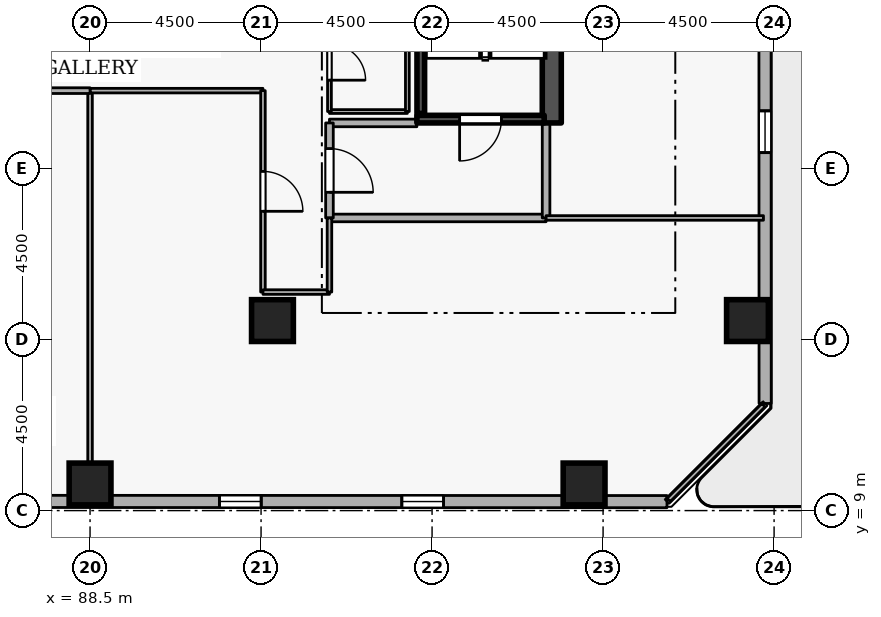
"""IFC4 building model, lengths in metres.
Left out: names, types, materials, properties, quantities, classifications, styles, units other than length and angle.
Written with IfcOpenShell. Run it as: python <this file> out.ifc"""

import sys

from ifc_helpers import new_model, si_unit, direction, frame, frame_2d, origin, origin_2d, place, context, subcontext, project, spatial, rectangle, extrude, element, fill, save


model = new_model("IFC4")
c1 = context("Model", 3, precision=1e-05, world=origin(), true_north=direction((0.0, 1.0)))
c2 = subcontext(c1, "Body", "Model", "MODEL_VIEW")
j1 = project(units=[si_unit("LENGTHUNIT", "METRE"), si_unit("PLANEANGLEUNIT", "RADIAN")], contexts=[c1])
p1 = place(None, origin())
s1 = spatial("IfcSite", under=j1, at=p1, CompositionType="ELEMENT")
p2 = place(p1, origin())
s2 = spatial("IfcBuilding", under=s1, at=p2, CompositionType="ELEMENT")
p3 = place(p2, frame((0.0, 0.0, 174.3)))
s3 = spatial("IfcBuildingStorey", under=s2, at=p3, CompositionType="ELEMENT", Elevation=174.3)
p4 = place(p3, frame((100.65, 19.2, 0.0), z_axis=(0.0, 0.0, 1.0), x_axis=(0.0, 1.0, 0.0)))
e1 = element("IfcWall", 1, at=p4, inside=s3, PredefinedType="SHEAR", context=c2, shape_type="SweptSolid", body=[
    extrude(rectangle(XDim=15.6, YDim=0.5, at=frame_2d((7.8, 0.0))), origin(), (0.0, 0.0, 1.0), 4.2),
])
for number, where, z_axis, x_axis in (
    (2, (105.8, 14.0, 0.0), (0.0, 0.0, 1.0), (1.0, 0.0, 0.0)),
    (3, (101.5, 9.7, 0.0), (0.0, 0.0, 1.0), (1.0, 0.0, 0.0)),
    (4, (88.5, 9.7, 0.0), (0.0, 0.0, 1.0), (1.0, 0.0, 0.0)),
    (5, (93.3, 14.0, 0.0), (0.0, 0.0, 1.0), (1.0, 0.0, 0.0)),
):
    element("IfcColumn", number, at=place(p3, frame(where, z_axis=z_axis, x_axis=x_axis)), inside=s3, PredefinedType="COLUMN", context=c2, shape_type="SweptSolid", body=[
        extrude(rectangle(XDim=1.1, YDim=1.1, at=origin_2d()), origin(), (0.0, 0.0, 1.0), 4.2),
    ])
p5 = place(p3, frame((70.904, 9.247, 0.0), z_axis=(0.0, 0.0, 1.0), x_axis=(0.999999933399, -0.000364968916, 0.0)))
e6 = element("IfcWall", 6, at=p5, inside=s3, PredefinedType="STANDARD", context=c2, shape_type="SweptSolid", body=[
    extrude(rectangle(XDim=32.778, YDim=0.32, at=frame_2d((16.389, 0.0))), origin(), (0.0, 0.0, 1.0), 3.3),
])
p6 = place(p5, frame((1.8, 0.0, 0.72)))
e7 = element("IfcOpeningElement", 7, at=p6, cuts=e6, PredefinedType="OPENING", context=c2, shape_type="SweptSolid", body=[
    extrude(rectangle(XDim=1.1, YDim=1.8, at=frame_2d((0.55, 0.9))), frame((0.0, 0.17, 0.0), z_axis=(0.0, -1.0, 0.0), x_axis=(1.0, 0.0, 0.0)), (0.0, 0.0, 1.0), 0.34),
])
p7 = place(p5, frame((6.6, 0.0, 0.72)))
e8 = element("IfcOpeningElement", 8, at=p7, cuts=e6, PredefinedType="OPENING", context=c2, shape_type="SweptSolid", body=[
    extrude(rectangle(XDim=1.1, YDim=1.8, at=frame_2d((0.55, 0.9))), frame((0.0, 0.17, 0.0), z_axis=(0.0, -1.0, 0.0), x_axis=(1.0, 0.0, 0.0)), (0.0, 0.0, 1.0), 0.34),
])
p8 = place(p5, frame((11.4, 0.0, 0.72)))
e9 = element("IfcOpeningElement", 9, at=p8, cuts=e6, PredefinedType="OPENING", context=c2, shape_type="SweptSolid", body=[
    extrude(rectangle(XDim=1.1, YDim=1.8, at=frame_2d((0.55, 0.9))), frame((0.0, 0.17, 0.0), z_axis=(0.0, -1.0, 0.0), x_axis=(1.0, 0.0, 0.0)), (0.0, 0.0, 1.0), 0.34),
])
p9 = place(p5, frame((21.0, 0.0, 0.72)))
e10 = element("IfcOpeningElement", 10, at=p9, cuts=e6, PredefinedType="OPENING", context=c2, shape_type="SweptSolid", body=[
    extrude(rectangle(XDim=1.1, YDim=1.8, at=frame_2d((0.55, 0.9))), frame((0.0, 0.17, 0.0), z_axis=(0.0, -1.0, 0.0), x_axis=(1.0, 0.0, 0.0)), (0.0, 0.0, 1.0), 0.34),
])
p10 = place(p5, frame((25.8, 0.0, 0.72)))
e11 = element("IfcOpeningElement", 11, at=p10, cuts=e6, PredefinedType="OPENING", context=c2, shape_type="SweptSolid", body=[
    extrude(rectangle(XDim=1.1, YDim=1.8, at=frame_2d((0.55, 0.9))), frame((0.0, 0.17, 0.0), z_axis=(0.0, -1.0, 0.0), x_axis=(1.0, 0.0, 0.0)), (0.0, 0.0, 1.0), 0.34),
])
p11 = place(p3, frame((106.265, 11.819, 0.0), z_axis=(0.0, 0.0, 1.0), x_axis=(-0.000364968916, 0.999999933399, 0.0)))
e12 = element("IfcWall", 12, at=p11, inside=s3, PredefinedType="STANDARD", context=c2, shape_type="SweptSolid", body=[
    extrude(rectangle(XDim=32.778, YDim=0.32, at=frame_2d((16.389, 0.0))), origin(), (0.0, 0.0, 1.0), 3.3),
])
p12 = place(p11, frame((23.514, 0.0, 0.0)))
e13 = element("IfcOpeningElement", 13, at=p12, cuts=e12, PredefinedType="OPENING", context=c2, shape_type="SweptSolid", body=[
    extrude(rectangle(XDim=1.15, YDim=2.1, at=frame_2d((0.575, 1.05))), frame((0.0, 0.17, 0.0), z_axis=(0.0, -1.0, 0.0), x_axis=(1.0, 0.0, 0.0)), (0.0, 0.0, 1.0), 0.34),
])
p13 = place(p11, frame((6.6, 0.0, 0.72)))
e14 = element("IfcOpeningElement", 14, at=p13, cuts=e12, PredefinedType="OPENING", context=c2, shape_type="SweptSolid", body=[
    extrude(rectangle(XDim=1.1, YDim=1.8, at=frame_2d((0.55, 0.9))), frame((0.0, 0.17, 0.0), z_axis=(0.0, -1.0, 0.0), x_axis=(1.0, 0.0, 0.0)), (0.0, 0.0, 1.0), 0.34),
])
p14 = place(p11, frame((11.4, 0.0, 0.72)))
e15 = element("IfcOpeningElement", 15, at=p14, cuts=e12, PredefinedType="OPENING", context=c2, shape_type="SweptSolid", body=[
    extrude(rectangle(XDim=1.1, YDim=1.8, at=frame_2d((0.55, 0.9))), frame((0.0, 0.17, 0.0), z_axis=(0.0, -1.0, 0.0), x_axis=(1.0, 0.0, 0.0)), (0.0, 0.0, 1.0), 0.34),
])
p15 = place(p11, frame((21.0, 0.0, 0.72)))
e16 = element("IfcOpeningElement", 16, at=p15, cuts=e12, PredefinedType="OPENING", context=c2, shape_type="SweptSolid", body=[
    extrude(rectangle(XDim=1.1, YDim=1.8, at=frame_2d((0.55, 0.9))), frame((0.0, 0.17, 0.0), z_axis=(0.0, -1.0, 0.0), x_axis=(1.0, 0.0, 0.0)), (0.0, 0.0, 1.0), 0.34),
])
p16 = place(p11, frame((25.8, 0.0, 0.72)))
e17 = element("IfcOpeningElement", 17, at=p16, cuts=e12, PredefinedType="OPENING", context=c2, shape_type="SweptSolid", body=[
    extrude(rectangle(XDim=1.1, YDim=1.8, at=frame_2d((0.55, 0.9))), frame((0.0, 0.17, 0.0), z_axis=(0.0, -1.0, 0.0), x_axis=(1.0, 0.0, 0.0)), (0.0, 0.0, 1.0), 0.34),
])
p17 = place(p3, frame((100.45, 19.3, 0.0), z_axis=(0.0, 0.0, 1.0), x_axis=(-1.0, 0.0, 0.0)))
e18 = element("IfcWall", 18, at=p17, inside=s3, PredefinedType="SHEAR", context=c2, shape_type="SweptSolid", body=[
    extrude(rectangle(XDim=3.35, YDim=0.2, at=frame_2d((1.675, 0.0))), origin(), (0.0, 0.0, 1.0), 4.2),
])
p18 = place(p17, frame((1.125, 0.0, 0.0)))
e19 = element("IfcOpeningElement", 19, at=p18, cuts=e18, PredefinedType="OPENING", context=c2, shape_type="SweptSolid", body=[
    extrude(rectangle(XDim=1.1, YDim=2.1, at=frame_2d((0.55, 1.05))), frame((0.0, 0.11, 0.0), z_axis=(0.0, -1.0, 0.0), x_axis=(1.0, 0.0, 0.0)), (0.0, 0.0, 1.0), 0.22),
])
p19 = place(p3, frame((97.203, 26.55, 0.0), z_axis=(0.0, 0.0, 1.0), x_axis=(0.0, -1.0, 0.0)))
e20 = element("IfcWall", 20, at=p19, inside=s3, PredefinedType="SHEAR", context=c2, shape_type="SweptSolid", body=[
    extrude(rectangle(XDim=7.1, YDim=0.2, at=frame_2d((3.55, 0.0))), origin(), (0.0, 0.0, 1.0), 4.2),
])
p20 = place(p3, frame((94.8, 16.7, 0.0), z_axis=(0.0, 0.0, 1.0), x_axis=(1.0, 0.0, 0.0)))
e21 = element("IfcWall", 21, at=p20, inside=s3, PredefinedType="STANDARD", context=c2, shape_type="SweptSolid", body=[
    extrude(rectangle(XDim=5.7, YDim=0.2, at=frame_2d((2.85, 0.0))), origin(), (0.0, 0.0, 1.0), 3.94),
])
p21 = place(p3, frame((100.5, 16.7, 0.0), z_axis=(0.0, 0.0, 1.0), x_axis=(0.0, 1.0, 0.0)))
e22 = element("IfcWall", 22, at=p21, inside=s3, PredefinedType="STANDARD", context=c2, shape_type="SweptSolid", body=[
    extrude(rectangle(XDim=2.5, YDim=0.2, at=frame_2d((1.25, 0.0))), origin(), (0.0, 0.0, 1.0), 3.94),
])
p22 = place(p3, frame((97.1, 19.2, 0.0), z_axis=(0.0, 0.0, 1.0), x_axis=(-1.0, 0.0, 0.0)))
e23 = element("IfcWall", 23, at=p22, inside=s3, PredefinedType="STANDARD", context=c2, shape_type="SweptSolid", body=[
    extrude(rectangle(XDim=2.3, YDim=0.2, at=frame_2d((1.15, 0.0))), origin(), (0.0, 0.0, 1.0), 3.145),
])
p23 = place(p3, frame((94.8, 19.2, 0.0), z_axis=(0.0, 0.0, 1.0), x_axis=(0.0, -1.0, 0.0)))
e24 = element("IfcWall", 24, at=p23, inside=s3, PredefinedType="STANDARD", context=c2, shape_type="SweptSolid", body=[
    extrude(rectangle(XDim=2.5, YDim=0.2, at=frame_2d((1.25, 0.0))), origin(), (0.0, 0.0, 1.0), 3.94),
])
p24 = place(p23, frame((0.675, 0.0, 0.0)))
e25 = element("IfcOpeningElement", 25, at=p24, cuts=e24, PredefinedType="OPENING", context=c2, shape_type="SweptSolid", body=[
    extrude(rectangle(XDim=1.15, YDim=2.1, at=frame_2d((0.575, 1.05))), frame((0.0, 0.11, 0.0), z_axis=(0.0, -1.0, 0.0), x_axis=(1.0, 0.0, 0.0)), (0.0, 0.0, 1.0), 0.22),
])
p25 = place(p3, frame((94.8, 19.5, 0.0), z_axis=(0.0, 0.0, 1.0), x_axis=(1.0, 0.0, 0.0)))
e26 = element("IfcWall", 26, at=p25, inside=s3, PredefinedType="PARTITIONING", context=c2, shape_type="SweptSolid", body=[
    extrude(rectangle(XDim=2.05, YDim=0.1, at=frame_2d((1.025, 0.0))), origin(), (0.0, 0.0, 1.0), 3.145),
])
p26 = place(p3, frame((96.85, 19.5, 0.0), z_axis=(0.0, 0.0, 1.0), x_axis=(0.0, 1.0, 0.0)))
e27 = element("IfcWall", 27, at=p26, inside=s3, PredefinedType="PARTITIONING", context=c2, shape_type="SweptSolid", body=[
    extrude(rectangle(XDim=2.6, YDim=0.1, at=frame_2d((1.3, 0.0))), origin(), (0.0, 0.0, 1.0), 3.94),
])
p27 = place(p3, frame((94.8, 22.1, 0.0), z_axis=(0.0, 0.0, 1.0), x_axis=(0.0, -1.0, 0.0)))
e28 = element("IfcWall", 28, at=p27, inside=s3, PredefinedType="PARTITIONING", context=c2, shape_type="SweptSolid", body=[
    extrude(rectangle(XDim=2.6, YDim=0.1, at=frame_2d((1.3, 0.0))), origin(), (0.0, 0.0, 1.0), 3.94),
])
p28 = place(p27, frame((0.825, 0.0, 0.0)))
e29 = element("IfcOpeningElement", 29, at=p28, cuts=e28, PredefinedType="OPENING", context=c2, shape_type="SweptSolid", body=[
    extrude(rectangle(XDim=0.95, YDim=2.1, at=frame_2d((0.475, 1.05))), frame((0.0, 0.06, 0.0), z_axis=(0.0, -1.0, 0.0), x_axis=(1.0, 0.0, 0.0)), (0.0, 0.0, 1.0), 0.12),
])
p29 = place(p3, frame((88.5, 9.28, 0.0), z_axis=(0.0, 0.0, 1.0), x_axis=(0.0, 1.0, 0.0)))
e30 = element("IfcWall", 30, at=p29, inside=s3, PredefinedType="PARTITIONING", context=c2, shape_type="SweptSolid", body=[
    extrude(rectangle(XDim=10.77, YDim=0.12, at=frame_2d((5.385, 0.0))), origin(), (0.0, 0.0, 1.0), 3.532),
])
p30 = place(p3, frame((88.5, 20.05, 0.0), z_axis=(0.0, 0.0, 1.0), x_axis=(1.0, 0.0, 0.0)))
e31 = element("IfcWall", 31, at=p30, inside=s3, PredefinedType="PARTITIONING", context=c2, shape_type="SweptSolid", body=[
    extrude(rectangle(XDim=4.55, YDim=0.12, at=frame_2d((2.275, 0.0))), origin(), (0.0, 0.0, 1.0), 3.94),
])
p31 = place(p3, frame((93.05, 20.05, 0.0), z_axis=(0.0, 0.0, 1.0), x_axis=(0.0, -1.0, 0.0)))
e32 = element("IfcWall", 32, at=p31, inside=s3, PredefinedType="PARTITIONING", context=c2, shape_type="SweptSolid", body=[
    extrude(rectangle(XDim=5.3, YDim=0.12, at=frame_2d((2.65, 0.0))), origin(), (0.0, 0.0, 1.0), 3.94),
])
p32 = place(p31, frame((2.125, 0.0, 0.0)))
e33 = element("IfcOpeningElement", 33, at=p32, cuts=e32, PredefinedType="OPENING", context=c2, shape_type="SweptSolid", body=[
    extrude(rectangle(XDim=1.05, YDim=2.1, at=frame_2d((0.525, 1.05))), frame((0.0, 0.07, 0.0), z_axis=(0.0, -1.0, 0.0), x_axis=(1.0, 0.0, 0.0)), (0.0, 0.0, 1.0), 0.14),
])
p33 = place(p3, frame((93.05, 14.75, 0.0), z_axis=(0.0, 0.0, 1.0), x_axis=(1.0, 0.0, 0.0)))
e34 = element("IfcWall", 34, at=p33, inside=s3, PredefinedType="PARTITIONING", context=c2, shape_type="SweptSolid", body=[
    extrude(rectangle(XDim=1.75, YDim=0.12, at=frame_2d((0.875, 0.0))), origin(), (0.0, 0.0, 1.0), 3.94),
])
p34 = place(p3, frame((94.8, 14.75, 0.0), z_axis=(0.0, 0.0, 1.0), x_axis=(0.0, 1.0, 0.0)))
e35 = element("IfcWall", 35, at=p34, inside=s3, PredefinedType="PARTITIONING", context=c2, shape_type="SweptSolid", body=[
    extrude(rectangle(XDim=1.95, YDim=0.12, at=frame_2d((0.975, 0.0))), origin(), (0.0, 0.0, 1.0), 3.94),
])
p35 = place(p3, frame((100.5, 16.7, 0.0), z_axis=(0.0, 0.0, 1.0), x_axis=(1.0, 0.0, 0.0)))
e36 = element("IfcWall", 36, at=p35, inside=s3, PredefinedType="PARTITIONING", context=c2, shape_type="SweptSolid", body=[
    extrude(rectangle(XDim=5.72, YDim=0.12, at=frame_2d((2.86, 0.0))), origin(), (0.0, 0.0, 1.0), 3.94),
])
p36 = place(p3, frame((106.22, 11.775, 0.0), z_axis=(0.0, 0.0, 1.0), x_axis=(-0.707106781187, -0.707106781187, 0.0)))
e37 = element("IfcWall", 37, at=p36, inside=s3, PredefinedType="PARTITIONING", context=c2, shape_type="SweptSolid", body=[
    extrude(rectangle(XDim=3.528, YDim=0.12, at=frame_2d((1.764, 0.0))), origin(), (0.0, 0.0, 1.0), 3.94),
])
p37 = place(p3, frame((83.95, 20.05, 0.0), z_axis=(0.0, 0.0, 1.0), x_axis=(1.0, 0.0, 0.0)))
e38 = element("IfcWall", 38, at=p37, inside=s3, PredefinedType="PARTITIONING", context=c2, shape_type="SweptSolid", body=[
    extrude(rectangle(XDim=4.55, YDim=0.15, at=frame_2d((2.275, 0.0))), origin(), (0.0, 0.0, 1.0), 3.94),
])
p38 = place(p9, origin())
e39 = element("IfcWindow", 39, at=p38, inside=s3, PartitioningType="SINGLE_PANEL", PredefinedType="WINDOW", context=c2, shape_type="SweptSolid", body=[
    extrude(rectangle(XDim=1.1, YDim=1.8, at=frame_2d((0.55, 0.9))), frame((0.0, 0.03, 0.0), z_axis=(0.0, -1.0, 0.0), x_axis=(1.0, 0.0, 0.0)), (0.0, 0.0, 1.0), 0.06),
])
fill(e10, e39)
p39 = place(p10, origin())
e40 = element("IfcWindow", 40, at=p39, inside=s3, PartitioningType="SINGLE_PANEL", PredefinedType="WINDOW", context=c2, shape_type="SweptSolid", body=[
    extrude(rectangle(XDim=1.1, YDim=1.8, at=frame_2d((0.55, 0.9))), frame((0.0, 0.03, 0.0), z_axis=(0.0, -1.0, 0.0), x_axis=(1.0, 0.0, 0.0)), (0.0, 0.0, 1.0), 0.06),
])
fill(e11, e40)
p40 = place(p13, origin())
e41 = element("IfcWindow", 41, at=p40, inside=s3, PartitioningType="SINGLE_PANEL", PredefinedType="WINDOW", context=c2, shape_type="SweptSolid", body=[
    extrude(rectangle(XDim=1.1, YDim=1.8, at=frame_2d((0.55, 0.9))), frame((0.0, 0.03, 0.0), z_axis=(0.0, -1.0, 0.0), x_axis=(1.0, 0.0, 0.0)), (0.0, 0.0, 1.0), 0.06),
])
fill(e14, e41)
p41 = place(p18, origin())
e42 = element("IfcDoor", 42, at=p41, inside=s3, OperationType="SINGLE_SWING_RIGHT", PredefinedType="DOOR", context=c2, shape_type="SweptSolid", body=[
    extrude(rectangle(XDim=1.1, YDim=2.1, at=frame_2d((0.55, 1.05))), frame((0.0, 0.025, 0.0), z_axis=(0.0, -1.0, 0.0), x_axis=(1.0, 0.0, 0.0)), (0.0, 0.0, 1.0), 0.05),
])
fill(e19, e42)
p42 = place(p24, origin())
e43 = element("IfcDoor", 43, at=p42, inside=s3, OperationType="SINGLE_SWING_RIGHT", PredefinedType="DOOR", context=c2, shape_type="SweptSolid", body=[
    extrude(rectangle(XDim=1.15, YDim=2.1, at=frame_2d((0.575, 1.05))), frame((0.0, 0.025, 0.0), z_axis=(0.0, -1.0, 0.0), x_axis=(1.0, 0.0, 0.0)), (0.0, 0.0, 1.0), 0.05),
])
fill(e25, e43)
p43 = place(p28, origin())
e44 = element("IfcDoor", 44, at=p43, inside=s3, OperationType="SINGLE_SWING_RIGHT", PredefinedType="DOOR", context=c2, shape_type="SweptSolid", body=[
    extrude(rectangle(XDim=0.95, YDim=2.1, at=frame_2d((0.475, 1.05))), frame((0.0, 0.025, 0.0), z_axis=(0.0, -1.0, 0.0), x_axis=(1.0, 0.0, 0.0)), (0.0, 0.0, 1.0), 0.05),
])
fill(e29, e44)
p44 = place(p32, origin())
e45 = element("IfcDoor", 45, at=p44, inside=s3, OperationType="SINGLE_SWING_RIGHT", PredefinedType="DOOR", context=c2, shape_type="SweptSolid", body=[
    extrude(rectangle(XDim=1.05, YDim=2.1, at=frame_2d((0.525, 1.05))), frame((0.0, 0.025, 0.0), z_axis=(0.0, -1.0, 0.0), x_axis=(1.0, 0.0, 0.0)), (0.0, 0.0, 1.0), 0.05),
])
fill(e33, e45)
save(model, sys.argv[1])
